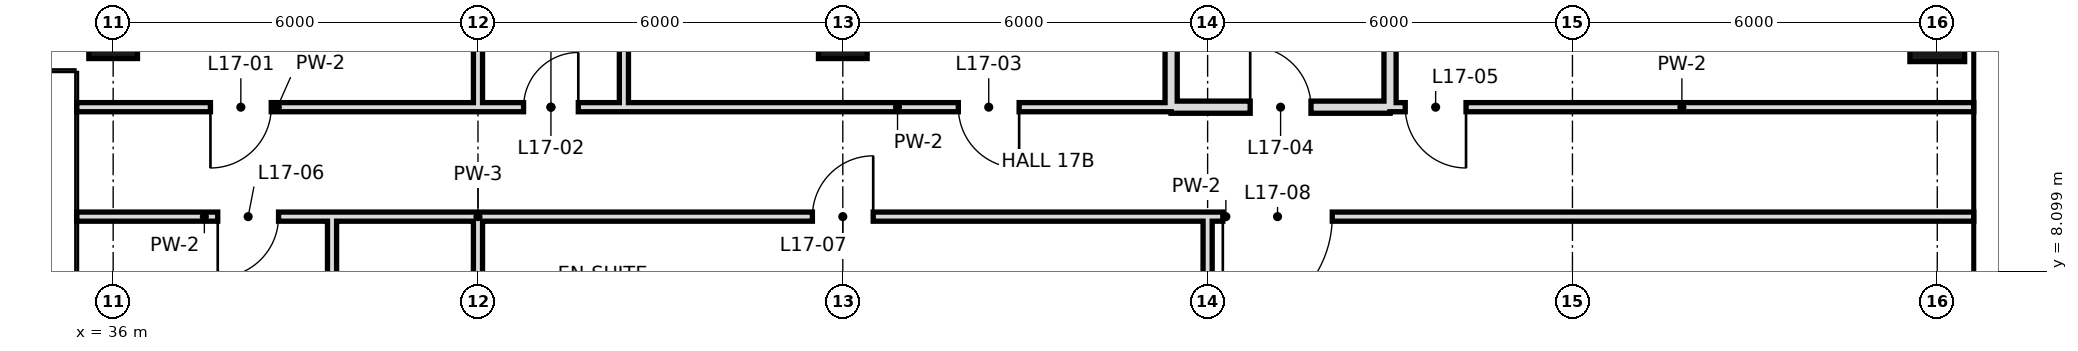
"""IFC4 building model, lengths in metres.
Left out: names, types, materials, properties, quantities, classifications, styles, units other than length and angle.
Written with IfcOpenShell. Run it as: python <this file> out.ifc"""

import sys

from ifc_helpers import new_model, si_unit, direction, frame, frame_2d, origin, origin_2d, place, context, subcontext, project, spatial, rectangle, hollow_rectangle, extrude, element, fill, save


model = new_model("IFC4")
c1 = context("Model", 3, precision=1e-05, world=origin(), true_north=direction((0.0, 1.0)))
c2 = subcontext(c1, "Body", "Model", "MODEL_VIEW")
j1 = project(units=[si_unit("LENGTHUNIT", "METRE"), si_unit("PLANEANGLEUNIT", "RADIAN")], contexts=[c1])
p1 = place(None, origin())
s1 = spatial("IfcSite", under=j1, at=p1, CompositionType="ELEMENT")
p2 = place(p1, origin())
s2 = spatial("IfcBuilding", under=s1, at=p2, CompositionType="ELEMENT")
p3 = place(p2, frame((0.0, 0.0, 82.2)))
s3 = spatial("IfcBuildingStorey", under=s2, at=p3, CompositionType="ELEMENT", Elevation=82.2)
for number, where, z_axis, x_axis in (
    (1, (36.0, 12.0, 0.0), (0.0, 0.0, 1.0), (1.0, 0.0, 0.0)),
    (2, (48.0, 12.0, 0.0), (0.0, 0.0, 1.0), (1.0, 0.0, 0.0)),
):
    element("IfcColumn", number, at=place(p3, frame(where, z_axis=z_axis, x_axis=x_axis)), inside=s3, PredefinedType="COLUMN", context=c2, shape_type="SweptSolid", body=[
        extrude(hollow_rectangle(XDim=0.8, YDim=0.8, WallThickness=0.04, at=origin_2d()), origin(), (0.0, 0.0, 1.0), 3.6),
    ])
p4 = place(p3, frame((66.0, 12.0, 0.0), z_axis=(0.0, 0.0, 1.0), x_axis=(1.0, 0.0, 0.0)))
e3 = element("IfcColumn", 3, at=p4, inside=s3, PredefinedType="COLUMN", context=c2, shape_type="SweptSolid", body=[
    extrude(hollow_rectangle(XDim=0.9, YDim=0.9, WallThickness=0.045, at=origin_2d()), origin(), (0.0, 0.0, 1.0), 3.6),
])
p5 = place(p3, frame((39.6, 6.0, 0.0), z_axis=(0.0, 0.0, 1.0), x_axis=(0.0, 1.0, 0.0)))
e4 = element("IfcWall", 4, at=p5, inside=s3, PredefinedType="PARTITIONING", context=c2, shape_type="SweptSolid", body=[
    extrude(rectangle(XDim=3.0, YDim=0.15, at=frame_2d((1.5, 0.0))), origin(), (0.0, 0.0, 1.0), 3.42),
])
p6 = place(p3, frame((42.0, 6.0, 0.0), z_axis=(0.0, 0.0, 1.0), x_axis=(0.0, 1.0, 0.0)))
e5 = element("IfcWall", 5, at=p6, inside=s3, PredefinedType="PARTITIONING", context=c2, shape_type="SweptSolid", body=[
    extrude(rectangle(XDim=3.0, YDim=0.15, at=frame_2d((1.5, 0.0))), origin(), (0.0, 0.0, 1.0), 2.72),
])
p7 = place(p3, frame((42.0, 10.8, 0.0), z_axis=(0.0, 0.0, 1.0), x_axis=(0.0, 1.0, 0.0)))
e6 = element("IfcWall", 6, at=p7, inside=s3, PredefinedType="PARTITIONING", context=c2, shape_type="SweptSolid", body=[
    extrude(rectangle(XDim=7.9, YDim=0.15, at=frame_2d((3.95, 0.0))), origin(), (0.0, 0.0, 1.0), 2.72),
])
p8 = place(p3, frame((44.4, 10.8, 0.0), z_axis=(0.0, 0.0, 1.0), x_axis=(0.0, 1.0, 0.0)))
e7 = element("IfcWall", 7, at=p8, inside=s3, PredefinedType="PARTITIONING", context=c2, shape_type="SweptSolid", body=[
    extrude(rectangle(XDim=7.9, YDim=0.15, at=frame_2d((3.95, 0.0))), origin(), (0.0, 0.0, 1.0), 3.42),
])
p9 = place(p3, frame((53.4, 10.8, 0.0), z_axis=(0.0, 0.0, 1.0), x_axis=(0.0, 1.0, 0.0)))
e8 = element("IfcWall", 8, at=p9, inside=s3, PredefinedType="SOLIDWALL", context=c2, shape_type="SweptSolid", body=[
    extrude(rectangle(XDim=7.2, YDim=0.2, at=frame_2d((3.6, 0.0))), origin(), (0.0, 0.0, 1.0), 2.52),
])
p10 = place(p3, frame((54.0, -0.6, 0.0), z_axis=(0.0, 0.0, 1.0), x_axis=(0.0, 1.0, 0.0)))
e9 = element("IfcWall", 9, at=p10, inside=s3, PredefinedType="PARTITIONING", context=c2, shape_type="SweptSolid", body=[
    extrude(rectangle(XDim=9.6, YDim=0.15, at=frame_2d((4.8, 0.0))), origin(), (0.0, 0.0, 1.0), 3.42),
])
p11 = place(p3, frame((57.0, 10.8, 0.0), z_axis=(0.0, 0.0, 1.0), x_axis=(0.0, 1.0, 0.0)))
e10 = element("IfcWall", 10, at=p11, inside=s3, PredefinedType="SOLIDWALL", context=c2, shape_type="SweptSolid", body=[
    extrude(rectangle(XDim=7.2, YDim=0.2, at=frame_2d((3.6, 0.0))), origin(), (0.0, 0.0, 1.0), 2.52),
])
p12 = place(p3, frame((53.4, 10.8, 0.0), z_axis=(0.0, 0.0, 1.0), x_axis=(1.0, 0.0, 0.0)))
e11 = element("IfcWall", 11, at=p12, inside=s3, PredefinedType="SOLIDWALL", context=c2, shape_type="SweptSolid", body=[
    extrude(rectangle(XDim=3.6, YDim=0.2, at=frame_2d((1.8, 0.0))), origin(), (0.0, 0.0, 1.0), 3.42),
])
p13 = place(p12, frame((1.3, 0.0, 0.0)))
e12 = element("IfcOpeningElement", 12, at=p13, cuts=e11, PredefinedType="OPENING", context=c2, shape_type="SweptSolid", body=[
    extrude(rectangle(XDim=1.0, YDim=2.4, at=frame_2d((0.5, 1.2))), frame((0.0, 0.11, 0.0), z_axis=(0.0, -1.0, 0.0), x_axis=(1.0, 0.0, 0.0)), (0.0, 0.0, 1.0), 0.22),
])
p14 = place(p3, frame((35.4, 10.8, 0.0), z_axis=(0.0, 0.0, 1.0), x_axis=(1.0, 0.0, 0.0)))
e13 = element("IfcWall", 13, at=p14, inside=s3, PredefinedType="PARTITIONING", context=c2, shape_type="SweptSolid", body=[
    extrude(rectangle(XDim=6.6, YDim=0.15, at=frame_2d((3.3, 0.0))), origin(), (0.0, 0.0, 1.0), 3.42),
])
p15 = place(p14, frame((2.2, 0.0, 0.0)))
e14 = element("IfcOpeningElement", 14, at=p15, cuts=e13, PredefinedType="OPENING", context=c2, shape_type="SweptSolid", body=[
    extrude(rectangle(XDim=1.0, YDim=2.4, at=frame_2d((0.5, 1.2))), frame((0.0, 0.085, 0.0), z_axis=(0.0, -1.0, 0.0), x_axis=(1.0, 0.0, 0.0)), (0.0, 0.0, 1.0), 0.17),
])
p16 = place(p3, frame((44.4, 10.8, 0.0), z_axis=(0.0, 0.0, 1.0), x_axis=(1.0, 0.0, 0.0)))
e15 = element("IfcWall", 15, at=p16, inside=s3, PredefinedType="PARTITIONING", context=c2, shape_type="SweptSolid", body=[
    extrude(rectangle(XDim=9.0, YDim=0.15, at=frame_2d((4.5, 0.0))), origin(), (0.0, 0.0, 1.0), 3.42),
])
p17 = place(p16, frame((5.5, 0.0, 0.0)))
e16 = element("IfcOpeningElement", 16, at=p17, cuts=e15, PredefinedType="OPENING", context=c2, shape_type="SweptSolid", body=[
    extrude(rectangle(XDim=1.0, YDim=2.4, at=frame_2d((0.5, 1.2))), frame((0.0, 0.085, 0.0), z_axis=(0.0, -1.0, 0.0), x_axis=(1.0, 0.0, 0.0)), (0.0, 0.0, 1.0), 0.17),
])
p18 = place(p3, frame((57.0, 10.8, 0.0), z_axis=(0.0, 0.0, 1.0), x_axis=(1.0, 0.0, 0.0)))
e17 = element("IfcWall", 17, at=p18, inside=s3, PredefinedType="PARTITIONING", context=c2, shape_type="SweptSolid", body=[
    extrude(rectangle(XDim=9.6, YDim=0.15, at=frame_2d((4.8, 0.0))), origin(), (0.0, 0.0, 1.0), 3.42),
])
p19 = place(p18, frame((0.25, 0.0, 0.0)))
e18 = element("IfcOpeningElement", 18, at=p19, cuts=e17, PredefinedType="OPENING", context=c2, shape_type="SweptSolid", body=[
    extrude(rectangle(XDim=1.0, YDim=2.4, at=frame_2d((0.5, 1.2))), frame((0.0, 0.085, 0.0), z_axis=(0.0, -1.0, 0.0), x_axis=(1.0, 0.0, 0.0)), (0.0, 0.0, 1.0), 0.17),
])
p20 = place(p3, frame((42.0, 10.8, 0.0), z_axis=(0.0, 0.0, 1.0), x_axis=(1.0, 0.0, 0.0)))
e19 = element("IfcWall", 19, at=p20, inside=s3, PredefinedType="PARTITIONING", context=c2, shape_type="SweptSolid", body=[
    extrude(rectangle(XDim=2.4, YDim=0.15, at=frame_2d((1.2, 0.0))), origin(), (0.0, 0.0, 1.0), 3.42),
])
p21 = place(p20, frame((0.75, 0.0, 0.0)))
e20 = element("IfcOpeningElement", 20, at=p21, cuts=e19, PredefinedType="OPENING", context=c2, shape_type="SweptSolid", body=[
    extrude(rectangle(XDim=0.9, YDim=2.4, at=frame_2d((0.45, 1.2))), frame((0.0, 0.085, 0.0), z_axis=(0.0, -1.0, 0.0), x_axis=(1.0, 0.0, 0.0)), (0.0, 0.0, 1.0), 0.17),
])
p22 = place(p3, frame((35.4, 9.0, 0.0), z_axis=(0.0, 0.0, 1.0), x_axis=(1.0, 0.0, 0.0)))
e21 = element("IfcWall", 21, at=p22, inside=s3, PredefinedType="PARTITIONING", context=c2, shape_type="SweptSolid", body=[
    extrude(rectangle(XDim=4.2, YDim=0.15, at=frame_2d((2.1, 0.0))), origin(), (0.0, 0.0, 1.0), 3.42),
])
p23 = place(p22, frame((2.32, 0.0, 0.0)))
e22 = element("IfcOpeningElement", 22, at=p23, cuts=e21, PredefinedType="OPENING", context=c2, shape_type="SweptSolid", body=[
    extrude(rectangle(XDim=1.0, YDim=2.4, at=frame_2d((0.5, 1.2))), frame((0.0, 0.085, 0.0), z_axis=(0.0, -1.0, 0.0), x_axis=(1.0, 0.0, 0.0)), (0.0, 0.0, 1.0), 0.17),
])
p24 = place(p3, frame((42.0, 9.0, 0.0), z_axis=(0.0, 0.0, 1.0), x_axis=(1.0, 0.0, 0.0)))
e23 = element("IfcWall", 23, at=p24, inside=s3, PredefinedType="PARTITIONING", context=c2, shape_type="SweptSolid", body=[
    extrude(rectangle(XDim=24.6, YDim=0.15, at=frame_2d((12.3, 0.0))), origin(), (0.0, 0.0, 1.0), 3.42),
])
p25 = place(p24, frame((5.5, 0.0, 0.0)))
e24 = element("IfcOpeningElement", 24, at=p25, cuts=e23, PredefinedType="OPENING", context=c2, shape_type="SweptSolid", body=[
    extrude(rectangle(XDim=1.0, YDim=2.4, at=frame_2d((0.5, 1.2))), frame((0.0, 0.085, 0.0), z_axis=(0.0, -1.0, 0.0), x_axis=(1.0, 0.0, 0.0)), (0.0, 0.0, 1.0), 0.17),
])
p26 = place(p24, frame((12.25, 0.0, 0.0)))
e25 = element("IfcOpeningElement", 25, at=p26, cuts=e23, PredefinedType="OPENING", context=c2, shape_type="SweptSolid", body=[
    extrude(rectangle(XDim=1.8, YDim=2.4, at=frame_2d((0.9, 1.2))), frame((0.0, 0.085, 0.0), z_axis=(0.0, -1.0, 0.0), x_axis=(1.0, 0.0, 0.0)), (0.0, 0.0, 1.0), 0.17),
])
p27 = place(p3, frame((39.6, 9.0, 0.0), z_axis=(0.0, 0.0, 1.0), x_axis=(1.0, 0.0, 0.0)))
e26 = element("IfcWall", 26, at=p27, inside=s3, PredefinedType="PARTITIONING", context=c2, shape_type="SweptSolid", body=[
    extrude(rectangle(XDim=2.4, YDim=0.15, at=frame_2d((1.2, 0.0))), origin(), (0.0, 0.0, 1.0), 3.42),
])
p28 = place(p15, frame((1.0, 0.0, 0.0), z_axis=(0.0, 0.0, 1.0), x_axis=(-1.0, 0.0, 0.0)))
e27 = element("IfcDoor", 27, at=p28, inside=s3, OperationType="SINGLE_SWING_RIGHT", PredefinedType="DOOR", context=c2, shape_type="SweptSolid", body=[
    extrude(rectangle(XDim=1.0, YDim=2.4, at=frame_2d((0.5, 1.2))), frame((0.0, 0.025, 0.0), z_axis=(0.0, -1.0, 0.0), x_axis=(1.0, 0.0, 0.0)), (0.0, 0.0, 1.0), 0.05),
])
fill(e14, e27)
p29 = place(p21, frame((0.9, 0.0, 0.0), z_axis=(0.0, 0.0, 1.0), x_axis=(-1.0, 0.0, 0.0)))
e28 = element("IfcDoor", 28, at=p29, inside=s3, OperationType="SINGLE_SWING_LEFT", PredefinedType="DOOR", context=c2, shape_type="SweptSolid", body=[
    extrude(rectangle(XDim=0.9, YDim=2.4, at=frame_2d((0.45, 1.2))), frame((0.0, 0.025, 0.0), z_axis=(0.0, -1.0, 0.0), x_axis=(1.0, 0.0, 0.0)), (0.0, 0.0, 1.0), 0.05),
])
fill(e20, e28)
p30 = place(p17, origin())
e29 = element("IfcDoor", 29, at=p30, inside=s3, OperationType="SINGLE_SWING_RIGHT", PredefinedType="DOOR", context=c2, shape_type="SweptSolid", body=[
    extrude(rectangle(XDim=1.0, YDim=2.4, at=frame_2d((0.5, 1.2))), frame((0.0, 0.025, 0.0), z_axis=(0.0, -1.0, 0.0), x_axis=(1.0, 0.0, 0.0)), (0.0, 0.0, 1.0), 0.05),
])
fill(e16, e29)
p31 = place(p13, origin())
e30 = element("IfcDoor", 30, at=p31, inside=s3, OperationType="SINGLE_SWING_LEFT", PredefinedType="DOOR", context=c2, shape_type="SweptSolid", body=[
    extrude(rectangle(XDim=1.0, YDim=2.4, at=frame_2d((0.5, 1.2))), frame((0.0, 0.025, 0.0), z_axis=(0.0, -1.0, 0.0), x_axis=(1.0, 0.0, 0.0)), (0.0, 0.0, 1.0), 0.05),
])
fill(e12, e30)
p32 = place(p19, origin())
e31 = element("IfcDoor", 31, at=p32, inside=s3, OperationType="SINGLE_SWING_RIGHT", PredefinedType="DOOR", context=c2, shape_type="SweptSolid", body=[
    extrude(rectangle(XDim=1.0, YDim=2.4, at=frame_2d((0.5, 1.2))), frame((0.0, 0.025, 0.0), z_axis=(0.0, -1.0, 0.0), x_axis=(1.0, 0.0, 0.0)), (0.0, 0.0, 1.0), 0.05),
])
fill(e18, e31)
p33 = place(p23, frame((1.0, 0.0, 0.0), z_axis=(0.0, 0.0, 1.0), x_axis=(-1.0, 0.0, 0.0)))
e32 = element("IfcDoor", 32, at=p33, inside=s3, OperationType="SINGLE_SWING_RIGHT", PredefinedType="DOOR", context=c2, shape_type="SweptSolid", body=[
    extrude(rectangle(XDim=1.0, YDim=2.4, at=frame_2d((0.5, 1.2))), frame((0.0, 0.025, 0.0), z_axis=(0.0, -1.0, 0.0), x_axis=(1.0, 0.0, 0.0)), (0.0, 0.0, 1.0), 0.05),
])
fill(e22, e32)
p34 = place(p25, frame((1.0, 0.0, 0.0), z_axis=(0.0, 0.0, 1.0), x_axis=(-1.0, 0.0, 0.0)))
e33 = element("IfcDoor", 33, at=p34, inside=s3, OperationType="SINGLE_SWING_LEFT", PredefinedType="DOOR", context=c2, shape_type="SweptSolid", body=[
    extrude(rectangle(XDim=1.0, YDim=2.4, at=frame_2d((0.5, 1.2))), frame((0.0, 0.025, 0.0), z_axis=(0.0, -1.0, 0.0), x_axis=(1.0, 0.0, 0.0)), (0.0, 0.0, 1.0), 0.05),
])
fill(e24, e33)
p35 = place(p26, frame((1.8, 0.0, 0.0), z_axis=(0.0, 0.0, 1.0), x_axis=(-1.0, 0.0, 0.0)))
e34 = element("IfcDoor", 34, at=p35, inside=s3, OperationType="SINGLE_SWING_RIGHT", PredefinedType="DOOR", context=c2, shape_type="SweptSolid", body=[
    extrude(rectangle(XDim=1.8, YDim=2.4, at=frame_2d((0.9, 1.2))), frame((0.0, 0.025, 0.0), z_axis=(0.0, -1.0, 0.0), x_axis=(1.0, 0.0, 0.0)), (0.0, 0.0, 1.0), 0.05),
])
fill(e25, e34)
save(model, sys.argv[1])
